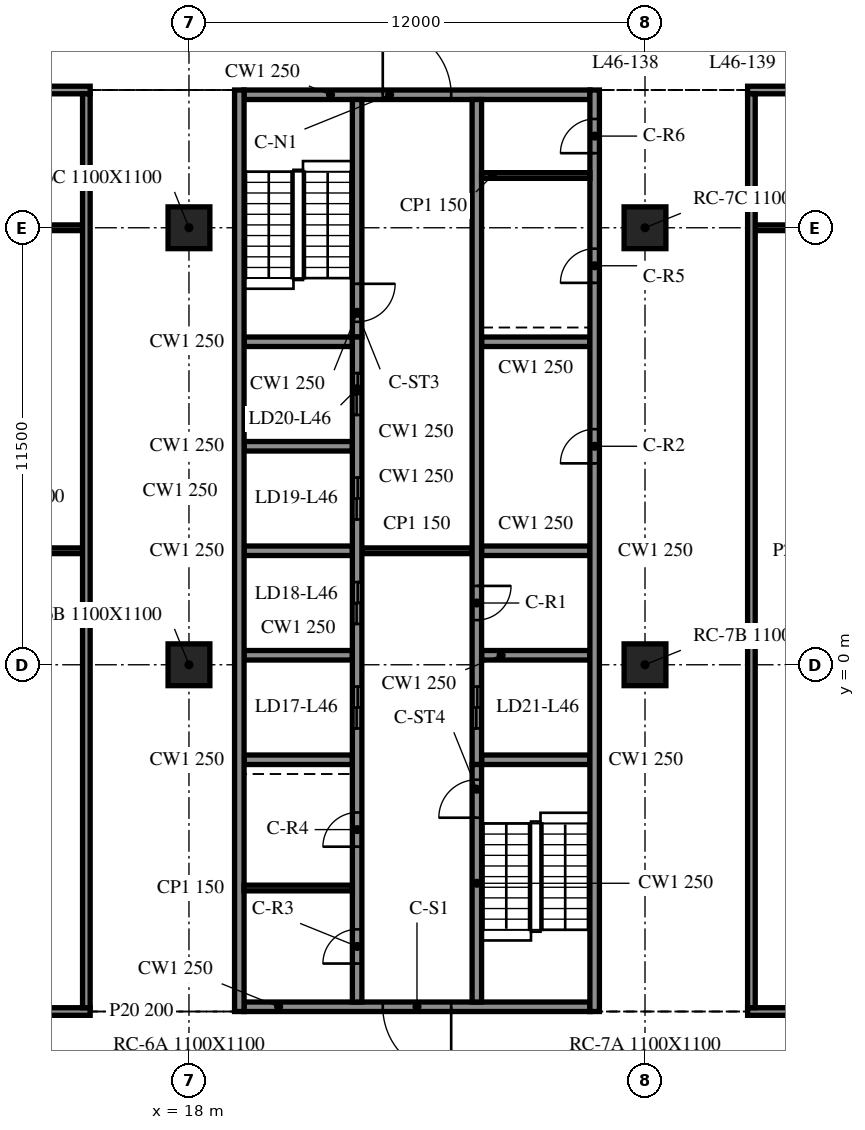
"""IFC4 building model, lengths in metres.
Left out: names, types, materials, properties, quantities, classifications, styles, units other than length and angle.
Written with IfcOpenShell. Run it as: python <this file> out.ifc"""

import sys

from ifc_helpers import new_model, si_unit, direction, frame, frame_2d, origin, origin_2d, place, context, subcontext, project, spatial, rectangle, extrude, element, fill, save


model = new_model("IFC4")
c1 = context("Model", 3, precision=1e-05, world=origin(), true_north=direction((0.0, 1.0)))
c2 = subcontext(c1, "Body", "Model", "MODEL_VIEW")
j1 = project(units=[si_unit("LENGTHUNIT", "METRE"), si_unit("PLANEANGLEUNIT", "RADIAN")], contexts=[c1])
p1 = place(None, origin())
s1 = spatial("IfcSite", under=j1, at=p1, CompositionType="ELEMENT")
p2 = place(p1, origin())
s2 = spatial("IfcBuilding", under=s1, at=p2, CompositionType="ELEMENT")
p3 = place(p2, frame((0.0, 0.0, 193.9)))
s3 = spatial("IfcBuildingStorey", under=s2, at=p3, CompositionType="ELEMENT", Elevation=193.9)
for number, where, z_axis, x_axis in (
    (1, (18.0, 0.0, -0.34), (0.0, 0.0, 1.0), (1.0, 0.0, 0.0)),
    (2, (18.0, 11.5, -0.34), (0.0, 0.0, 1.0), (1.0, 0.0, 0.0)),
    (3, (30.0, 0.0, -0.34), (0.0, 0.0, 1.0), (1.0, 0.0, 0.0)),
    (4, (30.0, 11.5, -0.34), (0.0, 0.0, 1.0), (1.0, 0.0, 0.0)),
):
    element("IfcColumn", number, at=place(p3, frame(where, z_axis=z_axis, x_axis=x_axis)), inside=s3, PredefinedType="COLUMN", context=c2, shape_type="SweptSolid", body=[
        extrude(rectangle(XDim=1.1, YDim=1.1, at=origin_2d()), origin(), (0.0, 0.0, 1.0), 3.8),
    ])
p4 = place(p3, frame((19.325, 15.125, 0.0), z_axis=(0.0, 0.0, 1.0), x_axis=(0.0, -1.0, 0.0)))
e5 = element("IfcWall", 5, at=p4, inside=s3, PredefinedType="SOLIDWALL", context=c2, shape_type="SweptSolid", body=[
    extrude(rectangle(XDim=24.25, YDim=0.25, at=frame_2d((12.125, 0.0))), origin(), (0.0, 0.0, 1.0), 3.46),
])
p5 = place(p3, frame((28.675, -9.125, 0.0), z_axis=(0.0, 0.0, 1.0), x_axis=(0.0, 1.0, 0.0)))
e6 = element("IfcWall", 6, at=p5, inside=s3, PredefinedType="SOLIDWALL", context=c2, shape_type="SweptSolid", body=[
    extrude(rectangle(XDim=24.25, YDim=0.25, at=frame_2d((12.125, 0.0))), origin(), (0.0, 0.0, 1.0), 3.46),
])
p6 = place(p5, frame((14.425, 0.0, 0.0)))
e7 = element("IfcOpeningElement", 7, at=p6, cuts=e6, PredefinedType="OPENING", context=c2, shape_type="SweptSolid", body=[
    extrude(rectangle(XDim=0.9, YDim=2.1, at=frame_2d((0.45, 1.05))), frame((0.0, 0.135, 0.0), z_axis=(0.0, -1.0, 0.0), x_axis=(1.0, 0.0, 0.0)), (0.0, 0.0, 1.0), 0.27),
])
p7 = place(p5, frame((19.175, 0.0, 0.0)))
e8 = element("IfcOpeningElement", 8, at=p7, cuts=e6, PredefinedType="OPENING", context=c2, shape_type="SweptSolid", body=[
    extrude(rectangle(XDim=0.9, YDim=2.1, at=frame_2d((0.45, 1.05))), frame((0.0, 0.135, 0.0), z_axis=(0.0, -1.0, 0.0), x_axis=(1.0, 0.0, 0.0)), (0.0, 0.0, 1.0), 0.27),
])
p8 = place(p5, frame((22.587, 0.0, 0.0)))
e9 = element("IfcOpeningElement", 9, at=p8, cuts=e6, PredefinedType="OPENING", context=c2, shape_type="SweptSolid", body=[
    extrude(rectangle(XDim=0.9, YDim=2.1, at=frame_2d((0.45, 1.05))), frame((0.0, 0.135, 0.0), z_axis=(0.0, -1.0, 0.0), x_axis=(1.0, 0.0, 0.0)), (0.0, 0.0, 1.0), 0.27),
])
p9 = place(p3, frame((28.55, -9.0, 0.0), z_axis=(0.0, 0.0, 1.0), x_axis=(-1.0, 0.0, 0.0)))
e10 = element("IfcWall", 10, at=p9, inside=s3, PredefinedType="SOLIDWALL", context=c2, shape_type="SweptSolid", body=[
    extrude(rectangle(XDim=9.1, YDim=0.25, at=frame_2d((4.55, 0.0))), origin(), (0.0, 0.0, 1.0), 3.46),
])
p10 = place(p9, frame((3.65, 0.0, 0.0)))
e11 = element("IfcOpeningElement", 11, at=p10, cuts=e10, PredefinedType="OPENING", context=c2, shape_type="SweptSolid", body=[
    extrude(rectangle(XDim=1.8, YDim=2.1, at=frame_2d((0.9, 1.05))), frame((0.0, 0.135, 0.0), z_axis=(0.0, -1.0, 0.0), x_axis=(1.0, 0.0, 0.0)), (0.0, 0.0, 1.0), 0.27),
])
p11 = place(p3, frame((19.45, 15.0, 0.0), z_axis=(0.0, 0.0, 1.0), x_axis=(1.0, 0.0, 0.0)))
e12 = element("IfcWall", 12, at=p11, inside=s3, PredefinedType="SOLIDWALL", context=c2, shape_type="SweptSolid", body=[
    extrude(rectangle(XDim=9.1, YDim=0.25, at=frame_2d((4.55, 0.0))), origin(), (0.0, 0.0, 1.0), 3.46),
])
p12 = place(p11, frame((3.65, 0.0, 0.0)))
e13 = element("IfcOpeningElement", 13, at=p12, cuts=e12, PredefinedType="OPENING", context=c2, shape_type="SweptSolid", body=[
    extrude(rectangle(XDim=1.8, YDim=2.1, at=frame_2d((0.9, 1.05))), frame((0.0, 0.135, 0.0), z_axis=(0.0, -1.0, 0.0), x_axis=(1.0, 0.0, 0.0)), (0.0, 0.0, 1.0), 0.27),
])
p13 = place(p3, frame((22.425, -8.875, 0.0), z_axis=(0.0, 0.0, 1.0), x_axis=(0.0, 1.0, 0.0)))
e14 = element("IfcWall", 14, at=p13, inside=s3, PredefinedType="SOLIDWALL", context=c2, shape_type="SweptSolid", body=[
    extrude(rectangle(XDim=17.5, YDim=0.25, at=frame_2d((8.75, 0.0))), origin(), (0.0, 0.0, 1.0), 3.46),
])
p14 = place(p13, frame((7.2, 0.0, 0.0)))
e15 = element("IfcOpeningElement", 15, at=p14, cuts=e14, PredefinedType="OPENING", context=c2, shape_type="SweptSolid", body=[
    extrude(rectangle(XDim=1.1, YDim=2.1, at=frame_2d((0.55, 1.05))), frame((0.0, 0.135, 0.0), z_axis=(0.0, -1.0, 0.0), x_axis=(1.0, 0.0, 0.0)), (0.0, 0.0, 1.0), 0.27),
])
p15 = place(p13, frame((9.95, 0.0, 0.0)))
e16 = element("IfcOpeningElement", 16, at=p15, cuts=e14, PredefinedType="OPENING", context=c2, shape_type="SweptSolid", body=[
    extrude(rectangle(XDim=1.1, YDim=2.1, at=frame_2d((0.55, 1.05))), frame((0.0, 0.135, 0.0), z_axis=(0.0, -1.0, 0.0), x_axis=(1.0, 0.0, 0.0)), (0.0, 0.0, 1.0), 0.27),
])
p16 = place(p13, frame((12.7, 0.0, 0.0)))
e17 = element("IfcOpeningElement", 17, at=p16, cuts=e14, PredefinedType="OPENING", context=c2, shape_type="SweptSolid", body=[
    extrude(rectangle(XDim=1.1, YDim=2.1, at=frame_2d((0.55, 1.05))), frame((0.0, 0.135, 0.0), z_axis=(0.0, -1.0, 0.0), x_axis=(1.0, 0.0, 0.0)), (0.0, 0.0, 1.0), 0.27),
])
p17 = place(p13, frame((15.45, 0.0, 0.0)))
e18 = element("IfcOpeningElement", 18, at=p17, cuts=e14, PredefinedType="OPENING", context=c2, shape_type="SweptSolid", body=[
    extrude(rectangle(XDim=1.1, YDim=2.1, at=frame_2d((0.55, 1.05))), frame((0.0, 0.135, 0.0), z_axis=(0.0, -1.0, 0.0), x_axis=(1.0, 0.0, 0.0)), (0.0, 0.0, 1.0), 0.27),
])
p18 = place(p13, frame((1.012, 0.0, 0.0)))
e19 = element("IfcOpeningElement", 19, at=p18, cuts=e14, PredefinedType="OPENING", context=c2, shape_type="SweptSolid", body=[
    extrude(rectangle(XDim=0.9, YDim=2.1, at=frame_2d((0.45, 1.05))), frame((0.0, 0.135, 0.0), z_axis=(0.0, -1.0, 0.0), x_axis=(1.0, 0.0, 0.0)), (0.0, 0.0, 1.0), 0.27),
])
p19 = place(p13, frame((4.087, 0.0, 0.0)))
e20 = element("IfcOpeningElement", 20, at=p19, cuts=e14, PredefinedType="OPENING", context=c2, shape_type="SweptSolid", body=[
    extrude(rectangle(XDim=0.9, YDim=2.1, at=frame_2d((0.45, 1.05))), frame((0.0, 0.135, 0.0), z_axis=(0.0, -1.0, 0.0), x_axis=(1.0, 0.0, 0.0)), (0.0, 0.0, 1.0), 0.27),
])
p20 = place(p3, frame((22.425, 14.875, 0.0), z_axis=(0.0, 0.0, 1.0), x_axis=(0.0, -1.0, 0.0)))
e21 = element("IfcWall", 21, at=p20, inside=s3, PredefinedType="SOLIDWALL", context=c2, shape_type="SweptSolid", body=[
    extrude(rectangle(XDim=6.25, YDim=0.25, at=frame_2d((3.125, 0.0))), origin(), (0.0, 0.0, 1.0), 3.46),
])
p21 = place(p20, frame((4.85, 0.0, 0.0)))
e22 = element("IfcOpeningElement", 22, at=p21, cuts=e21, PredefinedType="OPENING", context=c2, shape_type="SweptSolid", body=[
    extrude(rectangle(XDim=1.0, YDim=2.1, at=frame_2d((0.5, 1.05))), frame((0.0, 0.135, 0.0), z_axis=(0.0, -1.0, 0.0), x_axis=(1.0, 0.0, 0.0)), (0.0, 0.0, 1.0), 0.27),
])
p22 = place(p3, frame((25.575, -8.875, 0.0), z_axis=(0.0, 0.0, 1.0), x_axis=(0.0, 1.0, 0.0)))
e23 = element("IfcWall", 23, at=p22, inside=s3, PredefinedType="SOLIDWALL", context=c2, shape_type="SweptSolid", body=[
    extrude(rectangle(XDim=6.25, YDim=0.25, at=frame_2d((3.125, 0.0))), origin(), (0.0, 0.0, 1.0), 3.46),
])
p23 = place(p22, frame((4.85, 0.0, 0.0)))
e24 = element("IfcOpeningElement", 24, at=p23, cuts=e23, PredefinedType="OPENING", context=c2, shape_type="SweptSolid", body=[
    extrude(rectangle(XDim=1.0, YDim=2.1, at=frame_2d((0.5, 1.05))), frame((0.0, 0.135, 0.0), z_axis=(0.0, -1.0, 0.0), x_axis=(1.0, 0.0, 0.0)), (0.0, 0.0, 1.0), 0.27),
])
p24 = place(p3, frame((25.575, 14.875, 0.0), z_axis=(0.0, 0.0, 1.0), x_axis=(0.0, -1.0, 0.0)))
e25 = element("IfcWall", 25, at=p24, inside=s3, PredefinedType="SOLIDWALL", context=c2, shape_type="SweptSolid", body=[
    extrude(rectangle(XDim=17.5, YDim=0.25, at=frame_2d((8.75, 0.0))), origin(), (0.0, 0.0, 1.0), 3.46),
])
p25 = place(p24, frame((15.45, 0.0, 0.0)))
e26 = element("IfcOpeningElement", 26, at=p25, cuts=e25, PredefinedType="OPENING", context=c2, shape_type="SweptSolid", body=[
    extrude(rectangle(XDim=1.1, YDim=2.1, at=frame_2d((0.55, 1.05))), frame((0.0, 0.135, 0.0), z_axis=(0.0, -1.0, 0.0), x_axis=(1.0, 0.0, 0.0)), (0.0, 0.0, 1.0), 0.27),
])
p26 = place(p24, frame((12.8, 0.0, 0.0)))
e27 = element("IfcOpeningElement", 27, at=p26, cuts=e25, PredefinedType="OPENING", context=c2, shape_type="SweptSolid", body=[
    extrude(rectangle(XDim=0.9, YDim=2.1, at=frame_2d((0.45, 1.05))), frame((0.0, 0.135, 0.0), z_axis=(0.0, -1.0, 0.0), x_axis=(1.0, 0.0, 0.0)), (0.0, 0.0, 1.0), 0.27),
])
for number, where, z_axis, x_axis in (
    (28, (19.45, -2.5, 0.0), (0.0, 0.0, 1.0), (1.0, 0.0, 0.0)),
    (29, (19.45, 0.25, 0.0), (0.0, 0.0, 1.0), (1.0, 0.0, 0.0)),
    (30, (19.45, 3.0, 0.0), (0.0, 0.0, 1.0), (1.0, 0.0, 0.0)),
    (31, (19.45, 5.75, 0.0), (0.0, 0.0, 1.0), (1.0, 0.0, 0.0)),
    (32, (19.45, 8.5, 0.0), (0.0, 0.0, 1.0), (1.0, 0.0, 0.0)),
    (33, (25.7, -2.5, 0.0), (0.0, 0.0, 1.0), (1.0, 0.0, 0.0)),
    (34, (25.7, 0.25, 0.0), (0.0, 0.0, 1.0), (1.0, 0.0, 0.0)),
    (35, (25.7, 3.0, 0.0), (0.0, 0.0, 1.0), (1.0, 0.0, 0.0)),
    (36, (25.7, 8.5, 0.0), (0.0, 0.0, 1.0), (1.0, 0.0, 0.0)),
):
    element("IfcWall", number, at=place(p3, frame(where, z_axis=z_axis, x_axis=x_axis)), inside=s3, PredefinedType="SOLIDWALL", context=c2, shape_type="SweptSolid", body=[
        extrude(rectangle(XDim=2.85, YDim=0.25, at=frame_2d((1.425, 0.0))), origin(), (0.0, 0.0, 1.0), 3.46),
    ])
p27 = place(p3, frame((22.55, 3.0, 0.0), z_axis=(0.0, 0.0, 1.0), x_axis=(1.0, 0.0, 0.0)))
e37 = element("IfcWall", 37, at=p27, inside=s3, PredefinedType="PARTITIONING", context=c2, shape_type="SweptSolid", body=[
    extrude(rectangle(XDim=2.9, YDim=0.15, at=frame_2d((1.45, 0.0))), origin(), (0.0, 0.0, 1.0), 3.46),
])
for number, where, z_axis, x_axis in (
    (38, (19.45, -5.875, 0.0), (0.0, 0.0, 1.0), (1.0, 0.0, 0.0)),
    (39, (25.7, 12.875, 0.0), (0.0, 0.0, 1.0), (1.0, 0.0, 0.0)),
):
    element("IfcWall", number, at=place(p3, frame(where, z_axis=z_axis, x_axis=x_axis)), inside=s3, PredefinedType="PARTITIONING", context=c2, shape_type="SweptSolid", body=[
        extrude(rectangle(XDim=2.85, YDim=0.15, at=frame_2d((1.425, 0.0))), origin(), (0.0, 0.0, 1.0), 3.46),
    ])
p28 = place(p3, frame((8.5, -9.125, 0.0), z_axis=(0.0, 0.0, 1.0), x_axis=(1.0, 0.0, 0.0)))
e40 = element("IfcWall", 40, at=p28, inside=s3, PredefinedType="PARTITIONING", context=c2, shape_type="SweptSolid", body=[
    extrude(rectangle(XDim=6.9, YDim=0.2, at=frame_2d((3.45, 0.0))), origin(), (0.0, 0.0, 1.0), 3.46),
])
p29 = place(p28, frame((2.9, 0.0, 0.0)))
e41 = element("IfcOpeningElement", 41, at=p29, cuts=e40, PredefinedType="OPENING", context=c2, shape_type="SweptSolid", body=[
    extrude(rectangle(XDim=0.9, YDim=2.1, at=frame_2d((0.45, 1.05))), frame((0.0, 0.11, 0.0), z_axis=(0.0, -1.0, 0.0), x_axis=(1.0, 0.0, 0.0)), (0.0, 0.0, 1.0), 0.22),
])
p30 = place(p3, frame((32.7, -9.125, 0.0), z_axis=(0.0, 0.0, 1.0), x_axis=(1.0, 0.0, 0.0)))
e42 = element("IfcWall", 42, at=p30, inside=s3, PredefinedType="PARTITIONING", context=c2, shape_type="SweptSolid", body=[
    extrude(rectangle(XDim=21.15, YDim=0.2, at=frame_2d((10.575, 0.0))), origin(), (0.0, 0.0, 1.0), 3.46),
])
p31 = place(p30, frame((9.9, 0.0, 0.0)))
e43 = element("IfcOpeningElement", 43, at=p31, cuts=e42, PredefinedType="OPENING", context=c2, shape_type="SweptSolid", body=[
    extrude(rectangle(XDim=1.2, YDim=2.1, at=frame_2d((0.6, 1.05))), frame((0.0, 0.11, 0.0), z_axis=(0.0, -1.0, 0.0), x_axis=(1.0, 0.0, 0.0)), (0.0, 0.0, 1.0), 0.22),
])
for number, where, z_axis, x_axis in (
    (44, (8.7, 3.0, 0.0), (0.0, 0.0, 1.0), (1.0, 0.0, 0.0)),
    (45, (8.7, 11.5, 0.0), (0.0, 0.0, 1.0), (1.0, 0.0, 0.0)),
):
    element("IfcWall", number, at=place(p3, frame(where, z_axis=z_axis, x_axis=x_axis)), inside=s3, PredefinedType="PARTITIONING", context=c2, shape_type="SweptSolid", body=[
        extrude(rectangle(XDim=6.5, YDim=0.15, at=frame_2d((3.25, 0.0))), origin(), (0.0, 0.0, 1.0), 3.46),
    ])
p32 = place(p3, frame((32.9, 11.5, 0.0), z_axis=(0.0, 0.0, 1.0), x_axis=(1.0, 0.0, 0.0)))
e46 = element("IfcWall", 46, at=p32, inside=s3, PredefinedType="PARTITIONING", context=c2, shape_type="SweptSolid", body=[
    extrude(rectangle(XDim=8.55, YDim=0.15, at=frame_2d((4.275, 0.0))), origin(), (0.0, 0.0, 1.0), 3.46),
])
p33 = place(p3, frame((8.5, 15.125, 0.0), z_axis=(0.0, 0.0, 1.0), x_axis=(1.0, 0.0, 0.0)))
e47 = element("IfcWall", 47, at=p33, inside=s3, PredefinedType="PARTITIONING", context=c2, shape_type="SweptSolid", body=[
    extrude(rectangle(XDim=6.9, YDim=0.2, at=frame_2d((3.45, 0.0))), origin(), (0.0, 0.0, 1.0), 3.46),
])
p34 = place(p33, frame((2.9, 0.0, 0.0)))
e48 = element("IfcOpeningElement", 48, at=p34, cuts=e47, PredefinedType="OPENING", context=c2, shape_type="SweptSolid", body=[
    extrude(rectangle(XDim=1.0, YDim=2.1, at=frame_2d((0.5, 1.05))), frame((0.0, 0.11, 0.0), z_axis=(0.0, -1.0, 0.0), x_axis=(1.0, 0.0, 0.0)), (0.0, 0.0, 1.0), 0.22),
])
p35 = place(p3, frame((32.7, 15.125, 0.0), z_axis=(0.0, 0.0, 1.0), x_axis=(1.0, 0.0, 0.0)))
e49 = element("IfcWall", 49, at=p35, inside=s3, PredefinedType="PARTITIONING", context=c2, shape_type="SweptSolid", body=[
    extrude(rectangle(XDim=21.15, YDim=0.2, at=frame_2d((10.575, 0.0))), origin(), (0.0, 0.0, 1.0), 3.46),
])
p36 = place(p35, frame((9.9, 0.0, 0.0)))
e50 = element("IfcOpeningElement", 50, at=p36, cuts=e49, PredefinedType="OPENING", context=c2, shape_type="SweptSolid", body=[
    extrude(rectangle(XDim=1.2, YDim=2.1, at=frame_2d((0.6, 1.05))), frame((0.0, 0.11, 0.0), z_axis=(0.0, -1.0, 0.0), x_axis=(1.0, 0.0, 0.0)), (0.0, 0.0, 1.0), 0.22),
])
for number, where, z_axis, x_axis in (
    (51, (15.3, -9.025, 0.0), (0.0, 0.0, 1.0), (0.0, 1.0, 0.0)),
    (52, (32.8, -9.025, 0.0), (0.0, 0.0, 1.0), (0.0, 1.0, 0.0)),
):
    element("IfcWall", number, at=place(p3, frame(where, z_axis=z_axis, x_axis=x_axis)), inside=s3, PredefinedType="PARTITIONING", context=c2, shape_type="SweptSolid", body=[
        extrude(rectangle(XDim=24.05, YDim=0.2, at=frame_2d((12.025, 0.0))), origin(), (0.0, 0.0, 1.0), 3.46),
    ])
p37 = place(p10, origin())
e53 = element("IfcDoor", 53, at=p37, inside=s3, OperationType="DOUBLE_DOOR_SINGLE_SWING", PredefinedType="DOOR", context=c2, shape_type="SweptSolid", body=[
    extrude(rectangle(XDim=1.8, YDim=2.1, at=frame_2d((0.9, 1.05))), frame((0.0, 0.025, 0.0), z_axis=(0.0, -1.0, 0.0), x_axis=(1.0, 0.0, 0.0)), (0.0, 0.0, 1.0), 0.05),
])
fill(e11, e53)
p38 = place(p12, origin())
e54 = element("IfcDoor", 54, at=p38, inside=s3, OperationType="DOUBLE_DOOR_SINGLE_SWING", PredefinedType="DOOR", context=c2, shape_type="SweptSolid", body=[
    extrude(rectangle(XDim=1.8, YDim=2.1, at=frame_2d((0.9, 1.05))), frame((0.0, 0.025, 0.0), z_axis=(0.0, -1.0, 0.0), x_axis=(1.0, 0.0, 0.0)), (0.0, 0.0, 1.0), 0.05),
])
fill(e13, e54)
p39 = place(p25, origin())
e55 = element("IfcDoor", 55, at=p39, inside=s3, OperationType="DOUBLE_DOOR_SLIDING", PredefinedType="DOOR", context=c2, shape_type="SweptSolid", body=[
    extrude(rectangle(XDim=1.1, YDim=2.1, at=frame_2d((0.55, 1.05))), frame((0.0, 0.025, 0.0), z_axis=(0.0, -1.0, 0.0), x_axis=(1.0, 0.0, 0.0)), (0.0, 0.0, 1.0), 0.05),
])
fill(e26, e55)
p40 = place(p14, origin())
e56 = element("IfcDoor", 56, at=p40, inside=s3, OperationType="DOUBLE_DOOR_SLIDING", PredefinedType="DOOR", context=c2, shape_type="SweptSolid", body=[
    extrude(rectangle(XDim=1.1, YDim=2.1, at=frame_2d((0.55, 1.05))), frame((0.0, 0.025, 0.0), z_axis=(0.0, -1.0, 0.0), x_axis=(1.0, 0.0, 0.0)), (0.0, 0.0, 1.0), 0.05),
])
fill(e15, e56)
p41 = place(p15, origin())
e57 = element("IfcDoor", 57, at=p41, inside=s3, OperationType="DOUBLE_DOOR_SLIDING", PredefinedType="DOOR", context=c2, shape_type="SweptSolid", body=[
    extrude(rectangle(XDim=1.1, YDim=2.1, at=frame_2d((0.55, 1.05))), frame((0.0, 0.025, 0.0), z_axis=(0.0, -1.0, 0.0), x_axis=(1.0, 0.0, 0.0)), (0.0, 0.0, 1.0), 0.05),
])
fill(e16, e57)
p42 = place(p16, origin())
e58 = element("IfcDoor", 58, at=p42, inside=s3, OperationType="DOUBLE_DOOR_SLIDING", PredefinedType="DOOR", context=c2, shape_type="SweptSolid", body=[
    extrude(rectangle(XDim=1.1, YDim=2.1, at=frame_2d((0.55, 1.05))), frame((0.0, 0.025, 0.0), z_axis=(0.0, -1.0, 0.0), x_axis=(1.0, 0.0, 0.0)), (0.0, 0.0, 1.0), 0.05),
])
fill(e17, e58)
p43 = place(p17, origin())
e59 = element("IfcDoor", 59, at=p43, inside=s3, OperationType="DOUBLE_DOOR_SLIDING", PredefinedType="DOOR", context=c2, shape_type="SweptSolid", body=[
    extrude(rectangle(XDim=1.1, YDim=2.1, at=frame_2d((0.55, 1.05))), frame((0.0, 0.025, 0.0), z_axis=(0.0, -1.0, 0.0), x_axis=(1.0, 0.0, 0.0)), (0.0, 0.0, 1.0), 0.05),
])
fill(e18, e59)
p44 = place(p26, origin())
e60 = element("IfcDoor", 60, at=p44, inside=s3, OperationType="SINGLE_SWING_LEFT", PredefinedType="DOOR", context=c2, shape_type="SweptSolid", body=[
    extrude(rectangle(XDim=0.9, YDim=2.1, at=frame_2d((0.45, 1.05))), frame((0.0, 0.025, 0.0), z_axis=(0.0, -1.0, 0.0), x_axis=(1.0, 0.0, 0.0)), (0.0, 0.0, 1.0), 0.05),
])
fill(e27, e60)
p45 = place(p6, origin())
e61 = element("IfcDoor", 61, at=p45, inside=s3, OperationType="SINGLE_SWING_RIGHT", PredefinedType="DOOR", context=c2, shape_type="SweptSolid", body=[
    extrude(rectangle(XDim=0.9, YDim=2.1, at=frame_2d((0.45, 1.05))), frame((0.0, 0.025, 0.0), z_axis=(0.0, -1.0, 0.0), x_axis=(1.0, 0.0, 0.0)), (0.0, 0.0, 1.0), 0.05),
])
fill(e7, e61)
p46 = place(p18, origin())
e62 = element("IfcDoor", 62, at=p46, inside=s3, OperationType="SINGLE_SWING_LEFT", PredefinedType="DOOR", context=c2, shape_type="SweptSolid", body=[
    extrude(rectangle(XDim=0.9, YDim=2.1, at=frame_2d((0.45, 1.05))), frame((0.0, 0.025, 0.0), z_axis=(0.0, -1.0, 0.0), x_axis=(1.0, 0.0, 0.0)), (0.0, 0.0, 1.0), 0.05),
])
fill(e19, e62)
p47 = place(p19, origin())
e63 = element("IfcDoor", 63, at=p47, inside=s3, OperationType="SINGLE_SWING_RIGHT", PredefinedType="DOOR", context=c2, shape_type="SweptSolid", body=[
    extrude(rectangle(XDim=0.9, YDim=2.1, at=frame_2d((0.45, 1.05))), frame((0.0, 0.025, 0.0), z_axis=(0.0, -1.0, 0.0), x_axis=(1.0, 0.0, 0.0)), (0.0, 0.0, 1.0), 0.05),
])
fill(e20, e63)
p48 = place(p7, origin())
e64 = element("IfcDoor", 64, at=p48, inside=s3, OperationType="SINGLE_SWING_LEFT", PredefinedType="DOOR", context=c2, shape_type="SweptSolid", body=[
    extrude(rectangle(XDim=0.9, YDim=2.1, at=frame_2d((0.45, 1.05))), frame((0.0, 0.025, 0.0), z_axis=(0.0, -1.0, 0.0), x_axis=(1.0, 0.0, 0.0)), (0.0, 0.0, 1.0), 0.05),
])
fill(e8, e64)
p49 = place(p8, origin())
e65 = element("IfcDoor", 65, at=p49, inside=s3, OperationType="SINGLE_SWING_RIGHT", PredefinedType="DOOR", context=c2, shape_type="SweptSolid", body=[
    extrude(rectangle(XDim=0.9, YDim=2.1, at=frame_2d((0.45, 1.05))), frame((0.0, 0.025, 0.0), z_axis=(0.0, -1.0, 0.0), x_axis=(1.0, 0.0, 0.0)), (0.0, 0.0, 1.0), 0.05),
])
fill(e9, e65)
p50 = place(p21, origin())
e66 = element("IfcDoor", 66, at=p50, inside=s3, OperationType="SINGLE_SWING_LEFT", PredefinedType="DOOR", context=c2, shape_type="SweptSolid", body=[
    extrude(rectangle(XDim=1.0, YDim=2.1, at=frame_2d((0.5, 1.05))), frame((0.0, 0.025, 0.0), z_axis=(0.0, -1.0, 0.0), x_axis=(1.0, 0.0, 0.0)), (0.0, 0.0, 1.0), 0.05),
])
fill(e22, e66)
p51 = place(p23, origin())
e67 = element("IfcDoor", 67, at=p51, inside=s3, OperationType="SINGLE_SWING_RIGHT", PredefinedType="DOOR", context=c2, shape_type="SweptSolid", body=[
    extrude(rectangle(XDim=1.0, YDim=2.1, at=frame_2d((0.5, 1.05))), frame((0.0, 0.025, 0.0), z_axis=(0.0, -1.0, 0.0), x_axis=(1.0, 0.0, 0.0)), (0.0, 0.0, 1.0), 0.05),
])
fill(e24, e67)
save(model, sys.argv[1])
